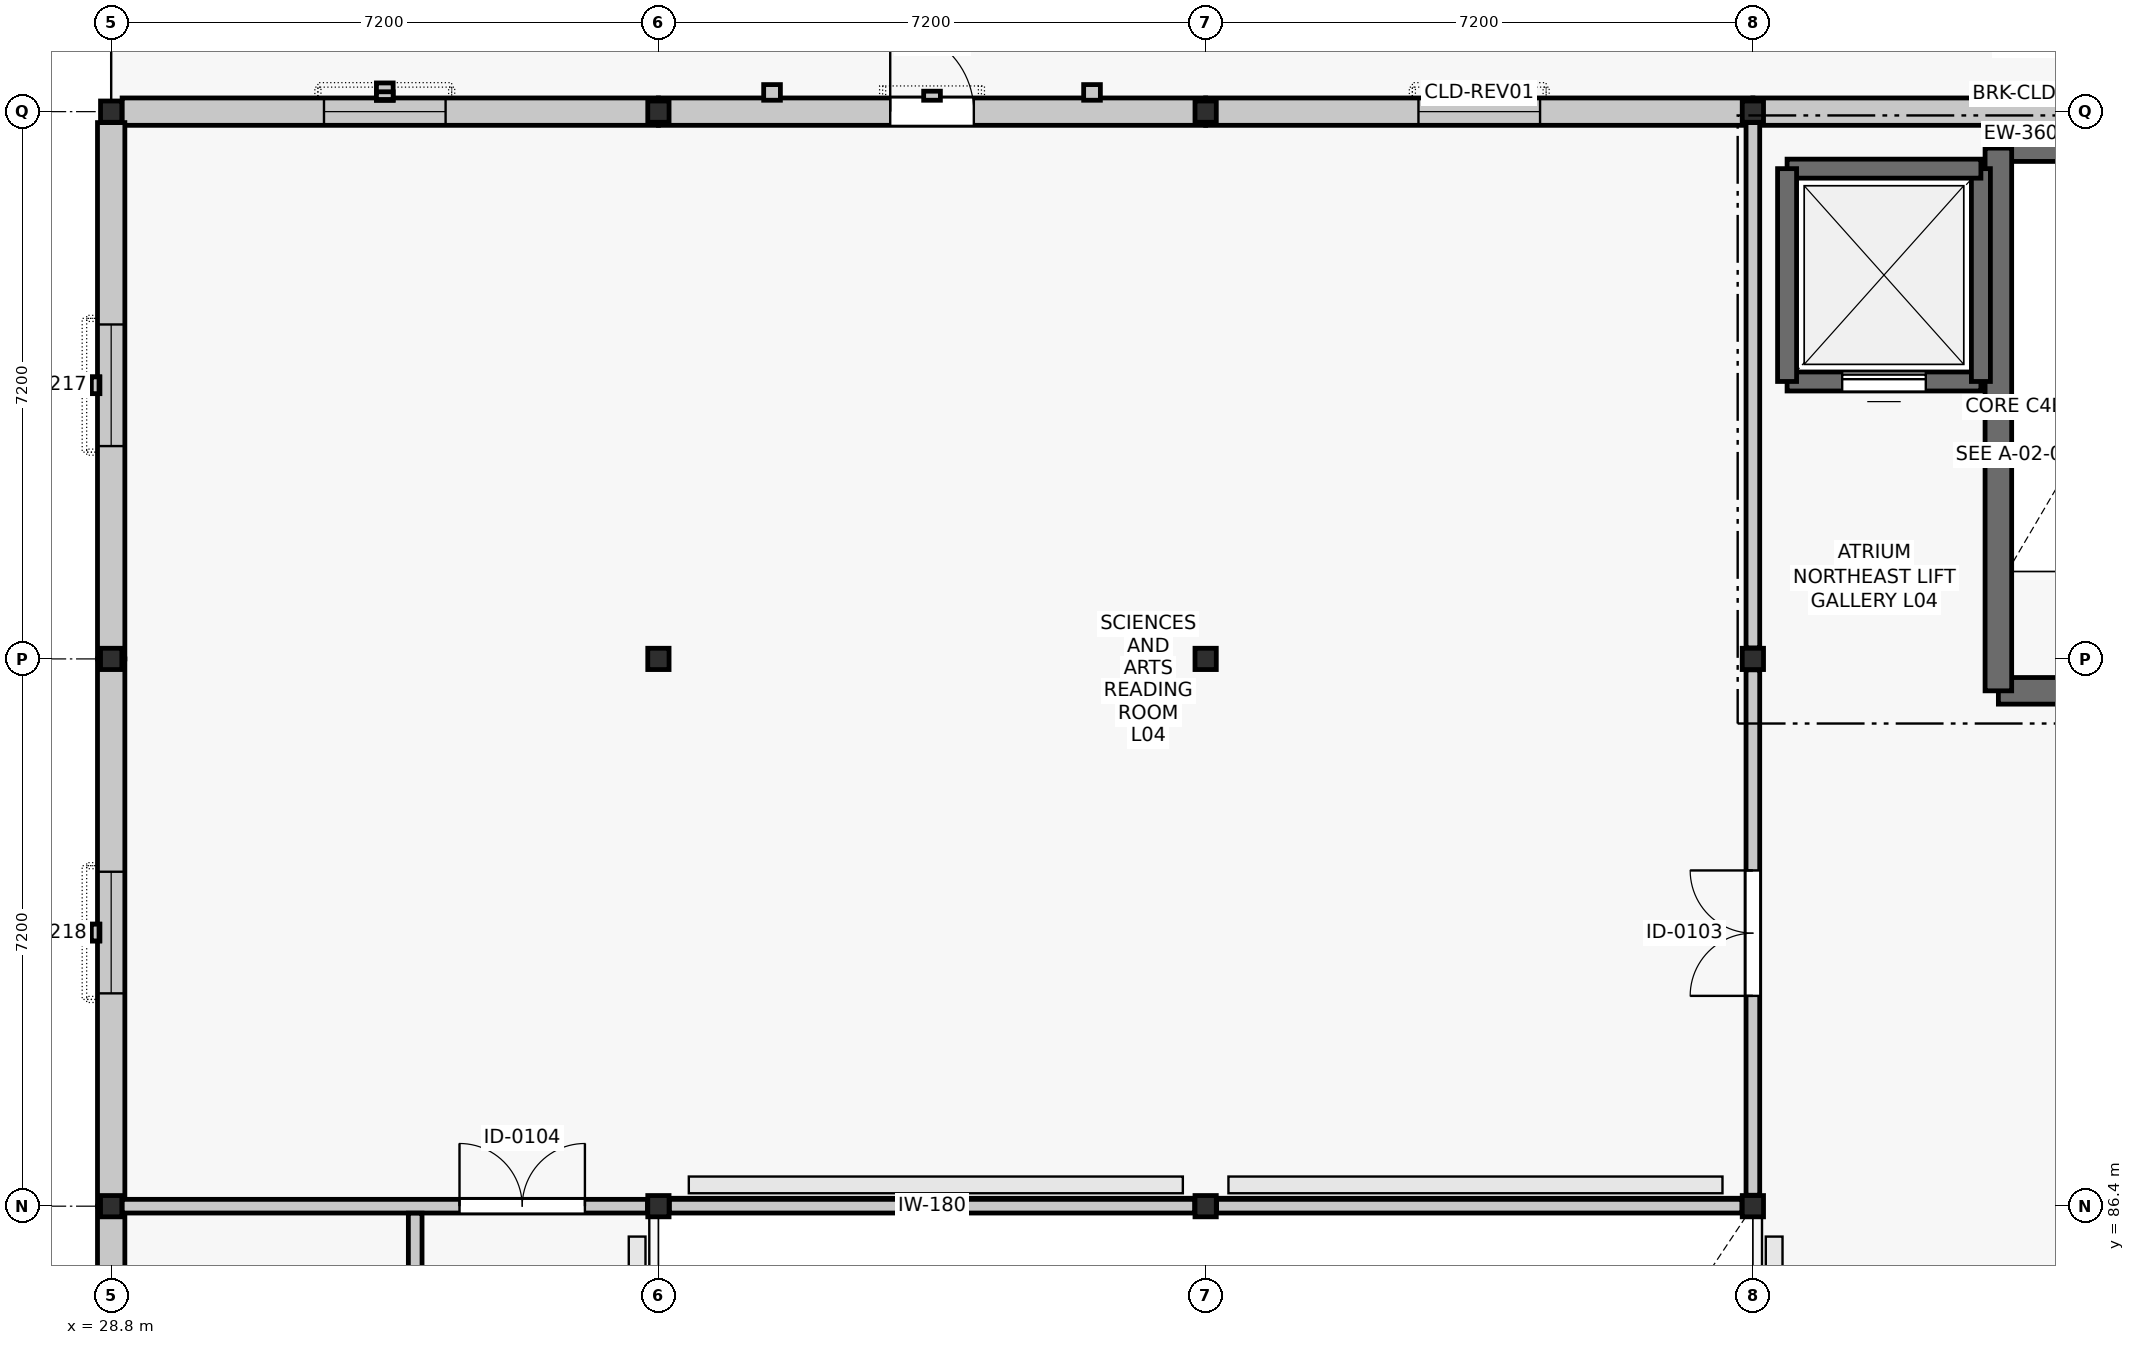
"""IFC4 building model, lengths in metres.
Left out: names, types, materials, properties, quantities, classifications, styles, units other than length and angle.
Written with IfcOpenShell. Run it as: python <this file> out.ifc"""

import sys

from ifc_helpers import new_model, si_unit, direction, frame, frame_2d, origin, origin_2d, place, context, subcontext, project, spatial, rectangle, i_section, extrude, element, fill, save


model = new_model("IFC4")
c1 = context("Model", 3, precision=1e-05, world=origin(), true_north=direction((0.0, 1.0)))
c2 = subcontext(c1, "Body", "Model", "MODEL_VIEW")
j1 = project(units=[si_unit("LENGTHUNIT", "METRE"), si_unit("PLANEANGLEUNIT", "RADIAN")], contexts=[c1])
p1 = place(None, origin())
s1 = spatial("IfcSite", under=j1, at=p1, CompositionType="ELEMENT")
p2 = place(p1, origin())
s2 = spatial("IfcBuilding", under=s1, at=p2, CompositionType="ELEMENT")
p3 = place(p2, frame((0.0, 0.0, 18.6)))
s3 = spatial("IfcBuildingStorey", under=s2, at=p3, CompositionType="ELEMENT", Elevation=18.6)
for number, where, z_axis, x_axis in (
    (1, (28.8, 86.4, 0.0), (0.0, 0.0, 1.0), (1.0, 0.0, 0.0)),
    (2, (28.8, 93.6, 0.0), (0.0, 0.0, 1.0), (1.0, 0.0, 0.0)),
    (3, (28.8, 100.8, 0.0), (0.0, 0.0, 1.0), (1.0, 0.0, 0.0)),
    (4, (36.0, 86.4, 0.0), (0.0, 0.0, 1.0), (1.0, 0.0, 0.0)),
    (5, (36.0, 93.6, 0.0), (0.0, 0.0, 1.0), (1.0, 0.0, 0.0)),
    (6, (36.0, 100.8, 0.0), (0.0, 0.0, 1.0), (1.0, 0.0, 0.0)),
    (7, (43.2, 86.4, 0.0), (0.0, 0.0, 1.0), (1.0, 0.0, 0.0)),
    (8, (43.2, 93.6, 0.0), (0.0, 0.0, 1.0), (1.0, 0.0, 0.0)),
    (9, (43.2, 100.8, 0.0), (0.0, 0.0, 1.0), (1.0, 0.0, 0.0)),
    (10, (50.4, 86.4, 0.0), (0.0, 0.0, 1.0), (1.0, 0.0, 0.0)),
    (11, (50.4, 93.6, 0.0), (0.0, 0.0, 1.0), (1.0, 0.0, 0.0)),
    (12, (50.4, 100.8, 0.0), (0.0, 0.0, 1.0), (1.0, 0.0, 0.0)),
):
    element("IfcColumn", number, at=place(p3, frame(where, z_axis=z_axis, x_axis=x_axis)), inside=s3, PredefinedType="COLUMN", context=c2, shape_type="SweptSolid", body=[
        extrude(i_section(OverallWidth=0.28, OverallDepth=0.28, WebThickness=0.01, FlangeThickness=0.018, FilletRadius=0.024, at=origin_2d()), origin(), (0.0, 0.0, 1.0), 4.2),
    ])
p4 = place(p3, frame((57.456, 100.8, 0.0), z_axis=(0.0, 0.0, 1.0), x_axis=(-1.0, 0.0, 0.0)))
e13 = element("IfcWall", 13, at=p4, inside=s3, PredefinedType="SOLIDWALL", context=c2, shape_type="SweptSolid", body=[
    extrude(rectangle(XDim=7.056, YDim=0.36, at=frame_2d((3.528, 0.0))), origin(), (0.0, 0.0, 1.0), 3.24),
])
p5 = place(p3, frame((50.4, 100.8, 0.0), z_axis=(0.0, 0.0, 1.0), x_axis=(-1.0, 0.0, 0.0)))
e14 = element("IfcWall", 14, at=p5, inside=s3, PredefinedType="SOLIDWALL", context=c2, shape_type="SweptSolid", body=[
    extrude(rectangle(XDim=7.2, YDim=0.36, at=frame_2d((3.6, 0.0))), origin(), (0.0, 0.0, 1.0), 3.24),
])
p6 = place(p5, frame((2.8, 0.0, 0.95)))
e15 = element("IfcOpeningElement", 15, at=p6, cuts=e14, PredefinedType="OPENING", context=c2, shape_type="SweptSolid", body=[
    extrude(rectangle(XDim=1.6, YDim=1.75, at=frame_2d((0.8, 0.875))), frame((0.0, 0.192, 0.0), z_axis=(0.0, -1.0, 0.0), x_axis=(1.0, 0.0, 0.0)), (0.0, 0.0, 1.0), 0.384),
])
p7 = place(p3, frame((43.2, 100.8, 0.0), z_axis=(0.0, 0.0, 1.0), x_axis=(-1.0, 0.0, 0.0)))
e16 = element("IfcWall", 16, at=p7, inside=s3, PredefinedType="SOLIDWALL", context=c2, shape_type="SweptSolid", body=[
    extrude(rectangle(XDim=7.2, YDim=0.36, at=frame_2d((3.6, 0.0))), origin(), (0.0, 0.0, 1.0), 3.24),
])
p8 = place(p7, frame((3.05, 0.0, 0.0)))
e17 = element("IfcOpeningElement", 17, at=p8, cuts=e16, PredefinedType="OPENING", context=c2, shape_type="SweptSolid", body=[
    extrude(rectangle(XDim=1.1, YDim=2.2, at=frame_2d((0.55, 1.1))), frame((0.0, 0.192, 0.0), z_axis=(0.0, -1.0, 0.0), x_axis=(1.0, 0.0, 0.0)), (0.0, 0.0, 1.0), 0.384),
])
p9 = place(p3, frame((36.0, 100.8, 0.0), z_axis=(0.0, 0.0, 1.0), x_axis=(-1.0, 0.0, 0.0)))
e18 = element("IfcWall", 18, at=p9, inside=s3, PredefinedType="SOLIDWALL", context=c2, shape_type="SweptSolid", body=[
    extrude(rectangle(XDim=7.056, YDim=0.36, at=frame_2d((3.528, 0.0))), origin(), (0.0, 0.0, 1.0), 3.24),
])
p10 = place(p9, frame((2.8, 0.0, 0.95)))
e19 = element("IfcOpeningElement", 19, at=p10, cuts=e18, PredefinedType="OPENING", context=c2, shape_type="SweptSolid", body=[
    extrude(rectangle(XDim=1.6, YDim=1.75, at=frame_2d((0.8, 0.875))), frame((0.0, 0.192, 0.0), z_axis=(0.0, -1.0, 0.0), x_axis=(1.0, 0.0, 0.0)), (0.0, 0.0, 1.0), 0.384),
])
p11 = place(p3, frame((28.8, 100.656, 0.0), z_axis=(0.0, 0.0, 1.0), x_axis=(0.0, -1.0, 0.0)))
e20 = element("IfcWall", 20, at=p11, inside=s3, PredefinedType="SOLIDWALL", context=c2, shape_type="SweptSolid", body=[
    extrude(rectangle(XDim=7.056, YDim=0.36, at=frame_2d((3.528, 0.0))), origin(), (0.0, 0.0, 1.0), 3.24),
])
p12 = place(p11, frame((2.656, 0.0, 0.95)))
e21 = element("IfcOpeningElement", 21, at=p12, cuts=e20, PredefinedType="OPENING", context=c2, shape_type="SweptSolid", body=[
    extrude(rectangle(XDim=1.6, YDim=1.75, at=frame_2d((0.8, 0.875))), frame((0.0, 0.192, 0.0), z_axis=(0.0, -1.0, 0.0), x_axis=(1.0, 0.0, 0.0)), (0.0, 0.0, 1.0), 0.384),
])
p13 = place(p3, frame((28.8, 93.6, 0.0), z_axis=(0.0, 0.0, 1.0), x_axis=(0.0, -1.0, 0.0)))
e22 = element("IfcWall", 22, at=p13, inside=s3, PredefinedType="SOLIDWALL", context=c2, shape_type="SweptSolid", body=[
    extrude(rectangle(XDim=7.2, YDim=0.36, at=frame_2d((3.6, 0.0))), origin(), (0.0, 0.0, 1.0), 3.24),
])
p14 = place(p13, frame((2.8, 0.0, 0.95)))
e23 = element("IfcOpeningElement", 23, at=p14, cuts=e22, PredefinedType="OPENING", context=c2, shape_type="SweptSolid", body=[
    extrude(rectangle(XDim=1.6, YDim=1.75, at=frame_2d((0.8, 0.875))), frame((0.0, 0.192, 0.0), z_axis=(0.0, -1.0, 0.0), x_axis=(1.0, 0.0, 0.0)), (0.0, 0.0, 1.0), 0.384),
])
p15 = place(p3, frame((28.8, 86.4, 0.0), z_axis=(0.0, 0.0, 1.0), x_axis=(0.0, -1.0, 0.0)))
e24 = element("IfcWall", 24, at=p15, inside=s3, PredefinedType="SOLIDWALL", context=c2, shape_type="SweptSolid", body=[
    extrude(rectangle(XDim=7.2, YDim=0.36, at=frame_2d((3.6, 0.0))), origin(), (0.0, 0.0, 1.0), 3.24),
])
p16 = place(p15, frame((2.8, 0.0, 0.95)))
e25 = element("IfcOpeningElement", 25, at=p16, cuts=e24, PredefinedType="OPENING", context=c2, shape_type="SweptSolid", body=[
    extrude(rectangle(XDim=1.6, YDim=1.75, at=frame_2d((0.8, 0.875))), frame((0.0, 0.192, 0.0), z_axis=(0.0, -1.0, 0.0), x_axis=(1.0, 0.0, 0.0)), (0.0, 0.0, 1.0), 0.384),
])
p17 = place(p3, frame((53.63, 93.18, 0.0), z_axis=(0.0, 0.0, 1.0), x_axis=(1.0, 0.0, 0.0)))
e26 = element("IfcWall", 26, at=p17, inside=s3, PredefinedType="SHEAR", context=c2, shape_type="SweptSolid", body=[
    extrude(rectangle(XDim=3.44, YDim=0.35, at=frame_2d((1.72, 0.0))), origin(), (0.0, 0.0, 1.0), 3.96),
])
p18 = place(p17, frame((1.17, 0.0, 0.0)))
e27 = element("IfcOpeningElement", 27, at=p18, cuts=e26, PredefinedType="OPENING", context=c2, shape_type="SweptSolid", body=[
    extrude(rectangle(XDim=1.1, YDim=2.15, at=frame_2d((0.55, 1.075))), frame((0.0, 0.187, 0.0), z_axis=(0.0, -1.0, 0.0), x_axis=(1.0, 0.0, 0.0)), (0.0, 0.0, 1.0), 0.374),
])
p19 = place(p3, frame((57.07, 100.32, 0.0), z_axis=(0.0, 0.0, 1.0), x_axis=(-1.0, 0.0, 0.0)))
e28 = element("IfcWall", 28, at=p19, inside=s3, PredefinedType="SHEAR", context=c2, shape_type="SweptSolid", body=[
    extrude(rectangle(XDim=3.44, YDim=0.35, at=frame_2d((1.72, 0.0))), origin(), (0.0, 0.0, 1.0), 3.96),
])
p20 = place(p3, frame((53.63, 100.32, 0.0), z_axis=(0.0, 0.0, 1.0), x_axis=(0.0, -1.0, 0.0)))
e29 = element("IfcWall", 29, at=p20, inside=s3, PredefinedType="SHEAR", context=c2, shape_type="SweptSolid", body=[
    extrude(rectangle(XDim=7.14, YDim=0.35, at=frame_2d((3.57, 0.0))), origin(), (0.0, 0.0, 1.0), 3.96),
])
p21 = place(p3, frame((50.85, 97.25, 0.0), z_axis=(0.0, 0.0, 1.0), x_axis=(1.0, 0.0, 0.0)))
e30 = element("IfcWall", 30, at=p21, inside=s3, PredefinedType="SHEAR", context=c2, shape_type="SweptSolid", body=[
    extrude(rectangle(XDim=2.55, YDim=0.25, at=frame_2d((1.275, 0.0))), origin(), (0.0, 0.0, 1.0), 3.96),
])
p22 = place(p21, frame((0.725, 0.0, 0.0)))
e31 = element("IfcOpeningElement", 31, at=p22, cuts=e30, PredefinedType="OPENING", context=c2, shape_type="SweptSolid", body=[
    extrude(rectangle(XDim=1.1, YDim=2.1, at=frame_2d((0.55, 1.05))), frame((0.0, 0.137, 0.0), z_axis=(0.0, -1.0, 0.0), x_axis=(1.0, 0.0, 0.0)), (0.0, 0.0, 1.0), 0.274),
])
p23 = place(p3, frame((53.4, 97.25, 0.0), z_axis=(0.0, 0.0, 1.0), x_axis=(0.0, 1.0, 0.0)))
e32 = element("IfcWall", 32, at=p23, inside=s3, PredefinedType="SHEAR", context=c2, shape_type="SweptSolid", body=[
    extrude(rectangle(XDim=2.8, YDim=0.25, at=frame_2d((1.4, 0.0))), origin(), (0.0, 0.0, 1.0), 3.96),
])
p24 = place(p3, frame((53.4, 100.05, 0.0), z_axis=(0.0, 0.0, 1.0), x_axis=(-1.0, 0.0, 0.0)))
e33 = element("IfcWall", 33, at=p24, inside=s3, PredefinedType="SHEAR", context=c2, shape_type="SweptSolid", body=[
    extrude(rectangle(XDim=2.55, YDim=0.25, at=frame_2d((1.275, 0.0))), origin(), (0.0, 0.0, 1.0), 3.96),
])
p25 = place(p3, frame((50.85, 100.05, 0.0), z_axis=(0.0, 0.0, 1.0), x_axis=(0.0, -1.0, 0.0)))
e34 = element("IfcWall", 34, at=p25, inside=s3, PredefinedType="SHEAR", context=c2, shape_type="SweptSolid", body=[
    extrude(rectangle(XDim=2.8, YDim=0.25, at=frame_2d((1.4, 0.0))), origin(), (0.0, 0.0, 1.0), 3.96),
])
p26 = place(p3, frame((28.944, 86.4, 0.0), z_axis=(0.0, 0.0, 1.0), x_axis=(1.0, 0.0, 0.0)))
e35 = element("IfcWall", 35, at=p26, inside=s3, PredefinedType="PARTITIONING", context=c2, shape_type="SweptSolid", body=[
    extrude(rectangle(XDim=6.912, YDim=0.18, at=frame_2d((3.456, 0.0))), origin(), (0.0, 0.0, 1.0), 3.595),
])
p27 = place(p26, frame((4.439, 0.0, 0.0)))
e36 = element("IfcOpeningElement", 36, at=p27, cuts=e35, PredefinedType="OPENING", context=c2, shape_type="SweptSolid", body=[
    extrude(rectangle(XDim=1.65, YDim=2.25, at=frame_2d((0.825, 1.125))), frame((0.0, 0.102, 0.0), z_axis=(0.0, -1.0, 0.0), x_axis=(1.0, 0.0, 0.0)), (0.0, 0.0, 1.0), 0.204),
])
p28 = place(p3, frame((36.144, 86.4, 0.0), z_axis=(0.0, 0.0, 1.0), x_axis=(1.0, 0.0, 0.0)))
e37 = element("IfcWall", 37, at=p28, inside=s3, PredefinedType="PARTITIONING", context=c2, shape_type="SweptSolid", body=[
    extrude(rectangle(XDim=6.912, YDim=0.18, at=frame_2d((3.456, 0.0))), origin(), (0.0, 0.0, 1.0), 3.245),
])
p29 = place(p3, frame((43.344, 86.4, 0.0), z_axis=(0.0, 0.0, 1.0), x_axis=(1.0, 0.0, 0.0)))
e38 = element("IfcWall", 38, at=p29, inside=s3, PredefinedType="PARTITIONING", context=c2, shape_type="SweptSolid", body=[
    extrude(rectangle(XDim=6.912, YDim=0.18, at=frame_2d((3.456, 0.0))), origin(), (0.0, 0.0, 1.0), 3.245),
])
p30 = place(p3, frame((50.4, 86.544, 0.0), z_axis=(0.0, 0.0, 1.0), x_axis=(0.0, 1.0, 0.0)))
e39 = element("IfcWall", 39, at=p30, inside=s3, PredefinedType="PARTITIONING", context=c2, shape_type="SweptSolid", body=[
    extrude(rectangle(XDim=6.912, YDim=0.18, at=frame_2d((3.456, 0.0))), origin(), (0.0, 0.0, 1.0), 3.595),
])
p31 = place(p30, frame((2.623, 0.0, 0.0)))
e40 = element("IfcOpeningElement", 40, at=p31, cuts=e39, PredefinedType="OPENING", context=c2, shape_type="SweptSolid", body=[
    extrude(rectangle(XDim=1.65, YDim=2.25, at=frame_2d((0.825, 1.125))), frame((0.0, 0.102, 0.0), z_axis=(0.0, -1.0, 0.0), x_axis=(1.0, 0.0, 0.0)), (0.0, 0.0, 1.0), 0.204),
])
p32 = place(p3, frame((50.4, 93.744, 0.0), z_axis=(0.0, 0.0, 1.0), x_axis=(0.0, 1.0, 0.0)))
e41 = element("IfcWall", 41, at=p32, inside=s3, PredefinedType="PARTITIONING", context=c2, shape_type="SweptSolid", body=[
    extrude(rectangle(XDim=6.912, YDim=0.18, at=frame_2d((3.456, 0.0))), origin(), (0.0, 0.0, 1.0), 3.595),
])
p33 = place(p3, frame((32.8, 78.277, 0.0), z_axis=(0.0, 0.0, 1.0), x_axis=(0.0, 1.0, 0.0)))
e42 = element("IfcWall", 42, at=p33, inside=s3, PredefinedType="PARTITIONING", context=c2, shape_type="SweptSolid", body=[
    extrude(rectangle(XDim=8.031, YDim=0.18, at=frame_2d((4.016, 0.0))), origin(), (0.0, 0.0, 1.0), 3.635),
])
p34 = place(p33, frame((3.19, 0.0, 0.0)))
e43 = element("IfcOpeningElement", 43, at=p34, cuts=e42, PredefinedType="OPENING", context=c2, shape_type="SweptSolid", body=[
    extrude(rectangle(XDim=1.65, YDim=2.25, at=frame_2d((0.825, 1.125))), frame((0.0, 0.102, 0.0), z_axis=(0.0, -1.0, 0.0), x_axis=(1.0, 0.0, 0.0)), (0.0, 0.0, 1.0), 0.204),
])
p35 = place(p6, origin())
e44 = element("IfcWindow", 44, at=p35, inside=s3, PartitioningType="SINGLE_PANEL", PredefinedType="WINDOW", context=c2, shape_type="SweptSolid", body=[
    extrude(rectangle(XDim=1.6, YDim=1.75, at=frame_2d((0.8, 0.875))), frame((0.0, 0.03, 0.0), z_axis=(0.0, -1.0, 0.0), x_axis=(1.0, 0.0, 0.0)), (0.0, 0.0, 1.0), 0.06),
])
fill(e15, e44)
p36 = place(p8, frame((1.1, 0.0, 0.0), z_axis=(0.0, 0.0, 1.0), x_axis=(-1.0, 0.0, 0.0)))
e45 = element("IfcDoor", 45, at=p36, inside=s3, OperationType="SINGLE_SWING_LEFT", PredefinedType="DOOR", context=c2, shape_type="SweptSolid", body=[
    extrude(rectangle(XDim=1.1, YDim=2.2, at=frame_2d((0.55, 1.1))), frame((0.0, 0.025, 0.0), z_axis=(0.0, -1.0, 0.0), x_axis=(1.0, 0.0, 0.0)), (0.0, 0.0, 1.0), 0.05),
])
fill(e17, e45)
p37 = place(p10, origin())
e46 = element("IfcWindow", 46, at=p37, inside=s3, PartitioningType="SINGLE_PANEL", PredefinedType="WINDOW", context=c2, shape_type="SweptSolid", body=[
    extrude(rectangle(XDim=1.6, YDim=1.75, at=frame_2d((0.8, 0.875))), frame((0.0, 0.03, 0.0), z_axis=(0.0, -1.0, 0.0), x_axis=(1.0, 0.0, 0.0)), (0.0, 0.0, 1.0), 0.06),
])
fill(e19, e46)
p38 = place(p12, origin())
e47 = element("IfcWindow", 47, at=p38, inside=s3, PartitioningType="SINGLE_PANEL", PredefinedType="WINDOW", context=c2, shape_type="SweptSolid", body=[
    extrude(rectangle(XDim=1.6, YDim=1.75, at=frame_2d((0.8, 0.875))), frame((0.0, 0.03, 0.0), z_axis=(0.0, -1.0, 0.0), x_axis=(1.0, 0.0, 0.0)), (0.0, 0.0, 1.0), 0.06),
])
fill(e21, e47)
p39 = place(p14, origin())
e48 = element("IfcWindow", 48, at=p39, inside=s3, PartitioningType="SINGLE_PANEL", PredefinedType="WINDOW", context=c2, shape_type="SweptSolid", body=[
    extrude(rectangle(XDim=1.6, YDim=1.75, at=frame_2d((0.8, 0.875))), frame((0.0, 0.03, 0.0), z_axis=(0.0, -1.0, 0.0), x_axis=(1.0, 0.0, 0.0)), (0.0, 0.0, 1.0), 0.06),
])
fill(e23, e48)
p40 = place(p22, origin())
e49 = element("IfcDoor", 49, at=p40, inside=s3, OperationType="SLIDING_TO_LEFT", PredefinedType="DOOR", context=c2, shape_type="SweptSolid", body=[
    extrude(rectangle(XDim=1.1, YDim=2.1, at=frame_2d((0.55, 1.05))), frame((0.0, 0.025, 0.0), z_axis=(0.0, -1.0, 0.0), x_axis=(1.0, 0.0, 0.0)), (0.0, 0.0, 1.0), 0.05),
])
fill(e31, e49)
p41 = place(p31, origin())
e50 = element("IfcDoor", 50, at=p41, inside=s3, OperationType="DOUBLE_DOOR_SINGLE_SWING", PredefinedType="DOOR", context=c2, shape_type="SweptSolid", body=[
    extrude(rectangle(XDim=1.65, YDim=2.25, at=frame_2d((0.825, 1.125))), frame((0.0, 0.025, 0.0), z_axis=(0.0, -1.0, 0.0), x_axis=(1.0, 0.0, 0.0)), (0.0, 0.0, 1.0), 0.05),
])
fill(e40, e50)
p42 = place(p27, origin())
e51 = element("IfcDoor", 51, at=p42, inside=s3, OperationType="DOUBLE_DOOR_SINGLE_SWING", PredefinedType="DOOR", context=c2, shape_type="SweptSolid", body=[
    extrude(rectangle(XDim=1.65, YDim=2.25, at=frame_2d((0.825, 1.125))), frame((0.0, 0.025, 0.0), z_axis=(0.0, -1.0, 0.0), x_axis=(1.0, 0.0, 0.0)), (0.0, 0.0, 1.0), 0.05),
])
fill(e36, e51)
save(model, sys.argv[1])
